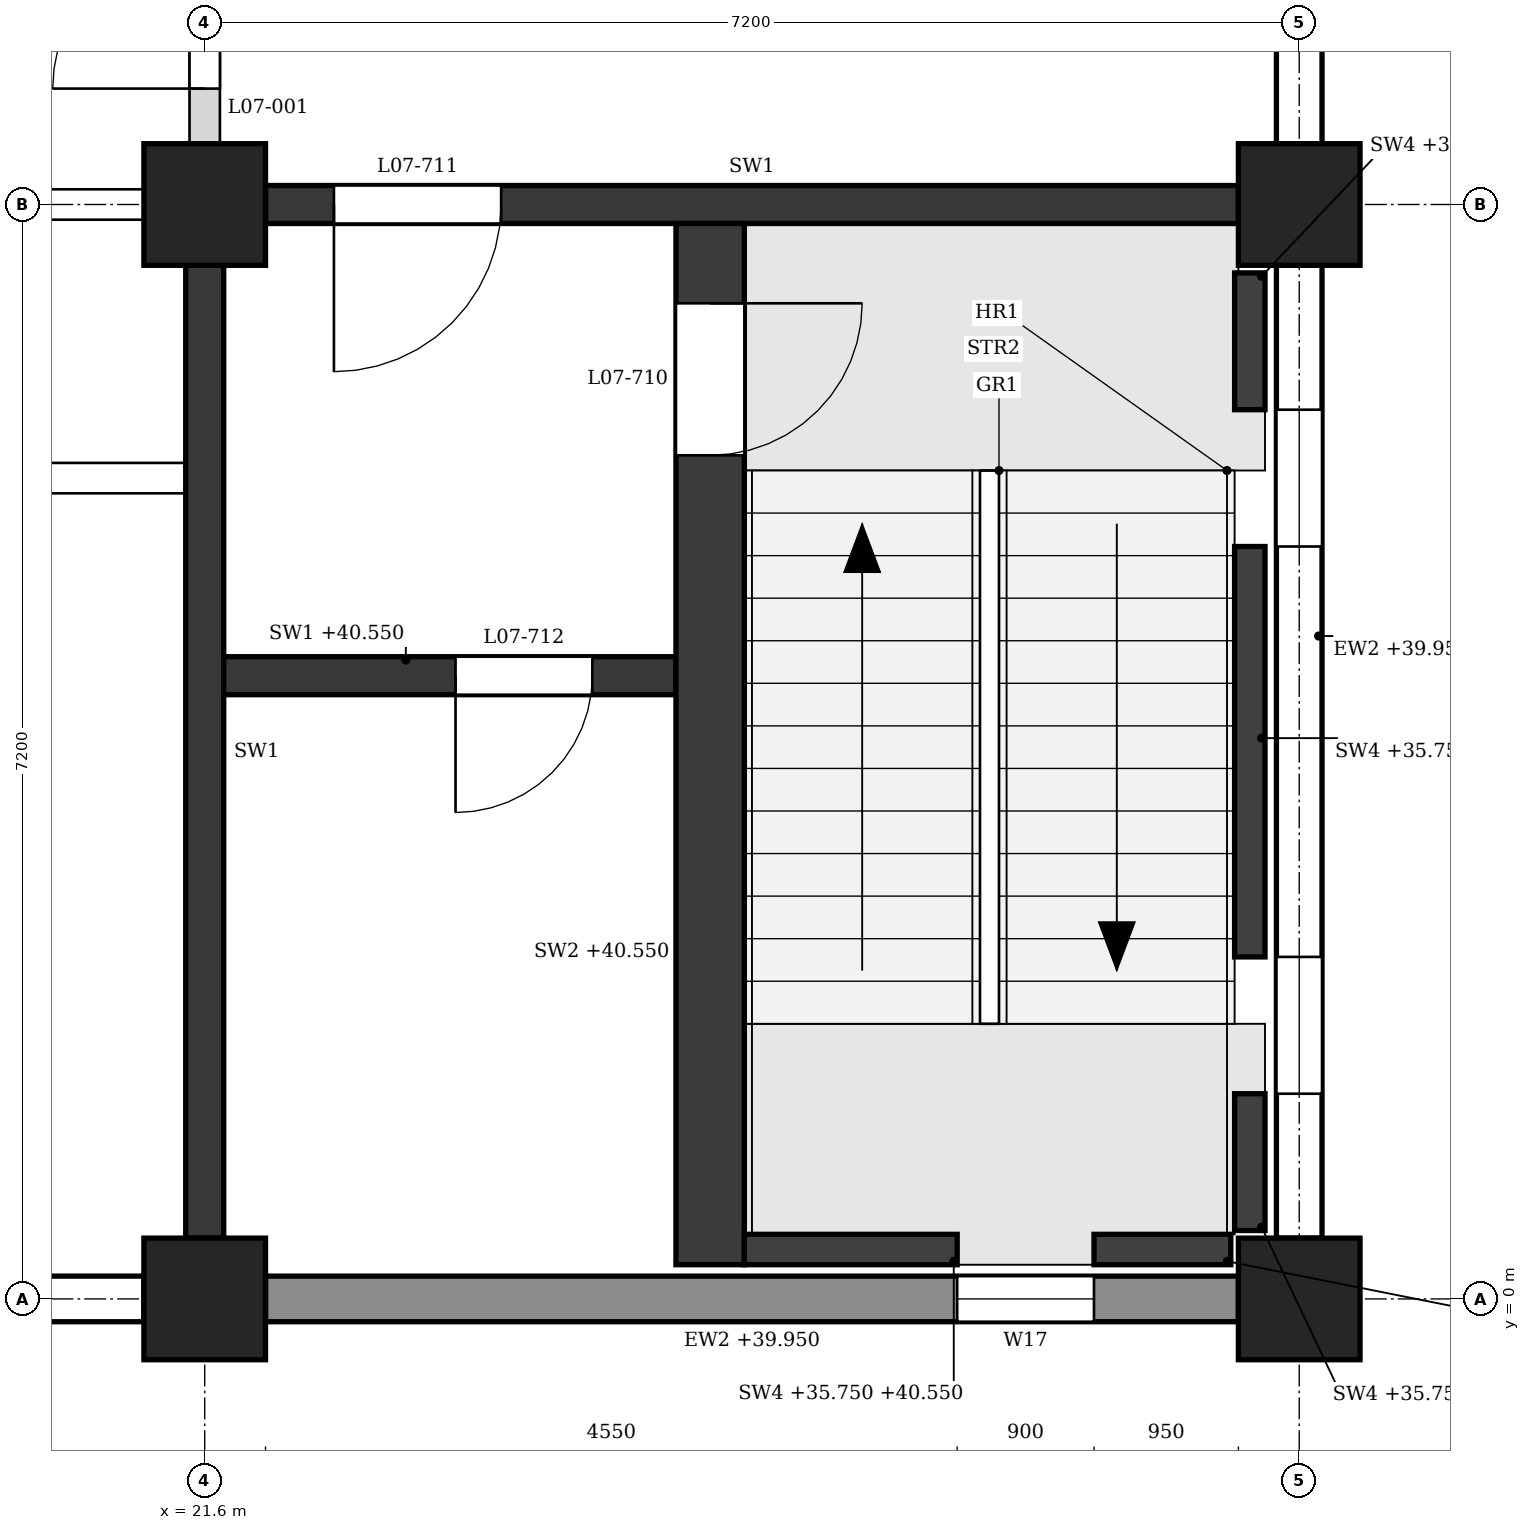
"""IFC4 building model, lengths in metres.
Left out: names, types, materials, properties, quantities, classifications, styles, units other than length and angle.
Written with IfcOpenShell. Run it as: python <this file> out.ifc"""

import sys

from ifc_helpers import new_model, si_unit, direction, frame, frame_2d, origin, origin_2d, place, context, subcontext, project, spatial, polyline, rectangle, outline, extrude, element, fill, save


model = new_model("IFC4")
c1 = context("Model", 3, precision=1e-05, world=origin(), true_north=direction((0.0, 1.0)))
c2 = subcontext(c1, "Body", "Model", "MODEL_VIEW")
j1 = project(units=[si_unit("LENGTHUNIT", "METRE"), si_unit("PLANEANGLEUNIT", "RADIAN")], contexts=[c1])
p1 = place(None, origin())
s1 = spatial("IfcSite", under=j1, at=p1, CompositionType="ELEMENT")
p2 = place(p1, origin())
s2 = spatial("IfcBuilding", under=s1, at=p2, CompositionType="ELEMENT")
p3 = place(p2, frame((0.0, 0.0, 36.0)))
s3 = spatial("IfcBuildingStorey", under=s2, at=p3, CompositionType="ELEMENT", Elevation=36.0)
for number, where, z_axis, x_axis in (
    (1, (21.6, 0.0, 0.0), (0.0, 0.0, 1.0), (1.0, 0.0, 0.0)),
    (2, (21.6, 7.2, 0.0), (0.0, 0.0, 1.0), (1.0, 0.0, 0.0)),
    (3, (28.8, 0.0, 0.0), (0.0, 0.0, 1.0), (1.0, 0.0, 0.0)),
    (4, (28.8, 7.2, 0.0), (0.0, 0.0, 1.0), (1.0, 0.0, 0.0)),
):
    element("IfcColumn", number, at=place(p3, frame(where, z_axis=z_axis, x_axis=x_axis)), inside=s3, PredefinedType="COLUMN", context=c2, shape_type="SweptSolid", body=[
        extrude(rectangle(XDim=0.8, YDim=0.8, at=origin_2d()), origin(), (0.0, 0.0, 1.0), 4.8),
    ])
p4 = place(p3, frame((14.8, 0.0, 0.0), z_axis=(0.0, 0.0, 1.0), x_axis=(1.0, 0.0, 0.0)))
e5 = element("IfcWall", 5, at=p4, inside=s3, PredefinedType="STANDARD", context=c2, shape_type="SweptSolid", body=[
    extrude(rectangle(XDim=6.4, YDim=0.3, at=frame_2d((3.2, 0.0))), origin(), (0.0, 0.0, 1.0), 3.95),
])
p5 = place(p4, frame((0.65, 0.0, 0.9)))
e6 = element("IfcOpeningElement", 6, at=p5, cuts=e5, PredefinedType="OPENING", context=c2, shape_type="SweptSolid", body=[
    extrude(outline(polyline([(0.0, 0.0), (1.5, 0.0), (1.5, 2.25), (0.75, 3.0), (0.0, 2.25), (0.0, 0.0)])), frame((0.0, 0.16, 0.0), z_axis=(0.0, -1.0, 0.0), x_axis=(1.0, 0.0, 0.0)), (0.0, 0.0, 1.0), 0.32),
])
p6 = place(p4, frame((4.25, 0.0, 0.9)))
e7 = element("IfcOpeningElement", 7, at=p6, cuts=e5, PredefinedType="OPENING", context=c2, shape_type="SweptSolid", body=[
    extrude(outline(polyline([(0.0, 0.0), (1.5, 0.0), (1.5, 2.25), (0.75, 3.0), (0.0, 2.25), (0.0, 0.0)])), frame((0.0, 0.16, 0.0), z_axis=(0.0, -1.0, 0.0), x_axis=(1.0, 0.0, 0.0)), (0.0, 0.0, 1.0), 0.32),
])
p7 = place(p3, frame((22.0, 0.0, 0.0), z_axis=(0.0, 0.0, 1.0), x_axis=(1.0, 0.0, 0.0)))
e8 = element("IfcWall", 8, at=p7, inside=s3, PredefinedType="STANDARD", context=c2, shape_type="SweptSolid", body=[
    extrude(rectangle(XDim=6.4, YDim=0.3, at=frame_2d((3.2, 0.0))), origin(), (0.0, 0.0, 1.0), 3.95),
])
p8 = place(p7, frame((4.55, 0.0, 0.9)))
e9 = element("IfcOpeningElement", 9, at=p8, cuts=e8, PredefinedType="OPENING", context=c2, shape_type="SweptSolid", body=[
    extrude(outline(polyline([(0.0, 0.0), (0.9, 0.0), (0.9, 2.55), (0.45, 3.0), (0.0, 2.55), (0.0, 0.0)])), frame((0.0, 0.16, 0.0), z_axis=(0.0, -1.0, 0.0), x_axis=(1.0, 0.0, 0.0)), (0.0, 0.0, 1.0), 0.32),
])
p9 = place(p3, frame((28.8, 0.4, 0.0), z_axis=(0.0, 0.0, 1.0), x_axis=(0.0, 1.0, 0.0)))
e10 = element("IfcWall", 10, at=p9, inside=s3, PredefinedType="STANDARD", context=c2, shape_type="SweptSolid", body=[
    extrude(rectangle(XDim=6.4, YDim=0.3, at=frame_2d((3.2, 0.0))), origin(), (0.0, 0.0, 1.0), 3.95),
])
p10 = place(p9, frame((0.95, 0.0, 0.9)))
e11 = element("IfcOpeningElement", 11, at=p10, cuts=e10, PredefinedType="OPENING", context=c2, shape_type="SweptSolid", body=[
    extrude(outline(polyline([(0.0, 0.0), (0.9, 0.0), (0.9, 2.55), (0.45, 3.0), (0.0, 2.55), (0.0, 0.0)])), frame((0.0, 0.16, 0.0), z_axis=(0.0, -1.0, 0.0), x_axis=(1.0, 0.0, 0.0)), (0.0, 0.0, 1.0), 0.32),
])
p11 = place(p9, frame((4.55, 0.0, 0.9)))
e12 = element("IfcOpeningElement", 12, at=p11, cuts=e10, PredefinedType="OPENING", context=c2, shape_type="SweptSolid", body=[
    extrude(outline(polyline([(0.0, 0.0), (0.9, 0.0), (0.9, 2.55), (0.45, 3.0), (0.0, 2.55), (0.0, 0.0)])), frame((0.0, 0.16, 0.0), z_axis=(0.0, -1.0, 0.0), x_axis=(1.0, 0.0, 0.0)), (0.0, 0.0, 1.0), 0.32),
])
p12 = place(p3, frame((28.8, 7.6, 0.0), z_axis=(0.0, 0.0, 1.0), x_axis=(0.0, 1.0, 0.0)))
e13 = element("IfcWall", 13, at=p12, inside=s3, PredefinedType="STANDARD", context=c2, shape_type="SweptSolid", body=[
    extrude(rectangle(XDim=6.4, YDim=0.3, at=frame_2d((3.2, 0.0))), origin(), (0.0, 0.0, 1.0), 3.95),
])
p13 = place(p12, frame((0.65, 0.0, 0.9)))
e14 = element("IfcOpeningElement", 14, at=p13, cuts=e13, PredefinedType="OPENING", context=c2, shape_type="SweptSolid", body=[
    extrude(outline(polyline([(0.0, 0.0), (1.5, 0.0), (1.5, 2.25), (0.75, 3.0), (0.0, 2.25), (0.0, 0.0)])), frame((0.0, 0.16, 0.0), z_axis=(0.0, -1.0, 0.0), x_axis=(1.0, 0.0, 0.0)), (0.0, 0.0, 1.0), 0.32),
])
p14 = place(p3, frame((22.0, 7.2, 0.0), z_axis=(0.0, 0.0, 1.0), x_axis=(1.0, 0.0, 0.0)))
e15 = element("IfcWall", 15, at=p14, inside=s3, PredefinedType="SHEAR", context=c2, shape_type="SweptSolid", body=[
    extrude(rectangle(XDim=6.4, YDim=0.25, at=frame_2d((3.2, 0.0))), origin(), (0.0, 0.0, 1.0), 3.85),
])
p15 = place(p14, frame((0.45, 0.0, 0.0)))
e16 = element("IfcOpeningElement", 16, at=p15, cuts=e15, PredefinedType="OPENING", context=c2, shape_type="SweptSolid", body=[
    extrude(rectangle(XDim=1.1, YDim=2.1, at=frame_2d((0.55, 1.05))), frame((0.0, 0.135, 0.0), z_axis=(0.0, -1.0, 0.0), x_axis=(1.0, 0.0, 0.0)), (0.0, 0.0, 1.0), 0.27),
])
p16 = place(p3, frame((21.6, 0.4, 0.0), z_axis=(0.0, 0.0, 1.0), x_axis=(0.0, 1.0, 0.0)))
e17 = element("IfcWall", 17, at=p16, inside=s3, PredefinedType="SHEAR", context=c2, shape_type="SweptSolid", body=[
    extrude(rectangle(XDim=6.4, YDim=0.25, at=frame_2d((3.2, 0.0))), origin(), (0.0, 0.0, 1.0), 3.85),
])
p17 = place(p3, frame((28.475, 0.45, -0.25), z_axis=(0.0, 0.0, 1.0), x_axis=(0.0, 1.0, 0.0)))
e18 = element("IfcWall", 18, at=p17, inside=s3, PredefinedType="SHEAR", context=c2, shape_type="SweptSolid", body=[
    extrude(rectangle(XDim=0.9, YDim=0.2, at=frame_2d((0.45, 0.0))), origin(), (0.0, 0.0, 1.0), 4.8),
])
p18 = place(p3, frame((28.475, 2.25, -0.25), z_axis=(0.0, 0.0, 1.0), x_axis=(0.0, 1.0, 0.0)))
e19 = element("IfcWall", 19, at=p18, inside=s3, PredefinedType="SHEAR", context=c2, shape_type="SweptSolid", body=[
    extrude(rectangle(XDim=2.7, YDim=0.2, at=frame_2d((1.35, 0.0))), origin(), (0.0, 0.0, 1.0), 4.8),
])
p19 = place(p3, frame((28.475, 5.85, -0.25), z_axis=(0.0, 0.0, 1.0), x_axis=(0.0, 1.0, 0.0)))
e20 = element("IfcWall", 20, at=p19, inside=s3, PredefinedType="SHEAR", context=c2, shape_type="SweptSolid", body=[
    extrude(rectangle(XDim=0.9, YDim=0.2, at=frame_2d((0.45, 0.0))), origin(), (0.0, 0.0, 1.0), 4.8),
])
p20 = place(p3, frame((25.15, 0.325, -0.25), z_axis=(0.0, 0.0, 1.0), x_axis=(1.0, 0.0, 0.0)))
e21 = element("IfcWall", 21, at=p20, inside=s3, PredefinedType="SHEAR", context=c2, shape_type="SweptSolid", body=[
    extrude(rectangle(XDim=1.4, YDim=0.2, at=frame_2d((0.7, 0.0))), origin(), (0.0, 0.0, 1.0), 4.8),
])
p21 = place(p3, frame((27.45, 0.325, -0.25), z_axis=(0.0, 0.0, 1.0), x_axis=(1.0, 0.0, 0.0)))
e22 = element("IfcWall", 22, at=p21, inside=s3, PredefinedType="SHEAR", context=c2, shape_type="SweptSolid", body=[
    extrude(rectangle(XDim=0.9, YDim=0.2, at=frame_2d((0.45, 0.0))), origin(), (0.0, 0.0, 1.0), 4.8),
])
p22 = place(p3, frame((24.925, 0.225, 0.0), z_axis=(0.0, 0.0, 1.0), x_axis=(0.0, 1.0, 0.0)))
e23 = element("IfcWall", 23, at=p22, inside=s3, PredefinedType="SHEAR", context=c2, shape_type="SweptSolid", body=[
    extrude(rectangle(XDim=6.85, YDim=0.45, at=frame_2d((3.425, 0.0))), origin(), (0.0, 0.0, 1.0), 4.55),
])
p23 = place(p22, frame((5.325, 0.0, 0.0)))
e24 = element("IfcOpeningElement", 24, at=p23, cuts=e23, PredefinedType="OPENING", context=c2, shape_type="SweptSolid", body=[
    extrude(rectangle(XDim=1.0, YDim=2.1, at=frame_2d((0.5, 1.05))), frame((0.0, 0.235, 0.0), z_axis=(0.0, -1.0, 0.0), x_axis=(1.0, 0.0, 0.0)), (0.0, 0.0, 1.0), 0.47),
])
p24 = place(p3, frame((21.725, 4.1, 0.0), z_axis=(0.0, 0.0, 1.0), x_axis=(1.0, 0.0, 0.0)))
e25 = element("IfcWall", 25, at=p24, inside=s3, PredefinedType="SHEAR", context=c2, shape_type="SweptSolid", body=[
    extrude(rectangle(XDim=2.975, YDim=0.25, at=frame_2d((1.487, 0.0))), origin(), (0.0, 0.0, 1.0), 4.55),
])
p25 = place(p24, frame((1.525, 0.0, 0.0)))
e26 = element("IfcOpeningElement", 26, at=p25, cuts=e25, PredefinedType="OPENING", context=c2, shape_type="SweptSolid", body=[
    extrude(rectangle(XDim=0.9, YDim=2.1, at=frame_2d((0.45, 1.05))), frame((0.0, 0.135, 0.0), z_axis=(0.0, -1.0, 0.0), x_axis=(1.0, 0.0, 0.0)), (0.0, 0.0, 1.0), 0.27),
])
p26 = place(p3, frame((7.325, 5.4, 0.0), z_axis=(0.0, 0.0, 1.0), x_axis=(1.0, 0.0, 0.0)))
e27 = element("IfcWall", 27, at=p26, inside=s3, PredefinedType="PARTITIONING", context=c2, shape_type="SweptSolid", body=[
    extrude(outline(polyline([(0.0, 0.0), (14.15, 0.0), (14.15, 3.85), (14.05, 3.85), (14.05, 4.55), (7.3, 4.55), (7.3, 3.85), (6.85, 3.85), (6.85, 4.55), (0.1, 4.55), (0.1, 3.85), (0.0, 3.85), (0.0, 0.0)])), frame((0.0, 0.1, 0.0), z_axis=(0.0, -1.0, 0.0), x_axis=(1.0, 0.0, 0.0)), (0.0, 0.0, 1.0), 0.2),
])
p27 = place(p26, frame((1.238, 0.0, 0.0)))
e28 = element("IfcOpeningElement", 28, at=p27, cuts=e27, PredefinedType="OPENING", context=c2, shape_type="SweptSolid", body=[
    extrude(rectangle(XDim=1.0, YDim=2.1, at=frame_2d((0.5, 1.05))), frame((0.0, 0.11, 0.0), z_axis=(0.0, -1.0, 0.0), x_axis=(1.0, 0.0, 0.0)), (0.0, 0.0, 1.0), 0.22),
])
p28 = place(p26, frame((4.775, 0.0, 0.0)))
e29 = element("IfcOpeningElement", 29, at=p28, cuts=e27, PredefinedType="OPENING", context=c2, shape_type="SweptSolid", body=[
    extrude(rectangle(XDim=1.0, YDim=2.1, at=frame_2d((0.5, 1.05))), frame((0.0, 0.11, 0.0), z_axis=(0.0, -1.0, 0.0), x_axis=(1.0, 0.0, 0.0)), (0.0, 0.0, 1.0), 0.22),
])
p29 = place(p26, frame((8.375, 0.0, 0.0)))
e30 = element("IfcOpeningElement", 30, at=p29, cuts=e27, PredefinedType="OPENING", context=c2, shape_type="SweptSolid", body=[
    extrude(rectangle(XDim=1.0, YDim=2.1, at=frame_2d((0.5, 1.05))), frame((0.0, 0.11, 0.0), z_axis=(0.0, -1.0, 0.0), x_axis=(1.0, 0.0, 0.0)), (0.0, 0.0, 1.0), 0.22),
])
p30 = place(p26, frame((11.913, 0.0, 0.0)))
e31 = element("IfcOpeningElement", 31, at=p30, cuts=e27, PredefinedType="OPENING", context=c2, shape_type="SweptSolid", body=[
    extrude(rectangle(XDim=1.0, YDim=2.1, at=frame_2d((0.5, 1.05))), frame((0.0, 0.11, 0.0), z_axis=(0.0, -1.0, 0.0), x_axis=(1.0, 0.0, 0.0)), (0.0, 0.0, 1.0), 0.22),
])
p31 = place(p3, frame((14.8, 7.2, 0.0), z_axis=(0.0, 0.0, 1.0), x_axis=(1.0, 0.0, 0.0)))
e32 = element("IfcWall", 32, at=p31, inside=s3, PredefinedType="PARTITIONING", context=c2, shape_type="SweptSolid", body=[
    extrude(rectangle(XDim=6.4, YDim=0.2, at=frame_2d((3.2, 0.0))), origin(), (0.0, 0.0, 1.0), 3.85),
])
p32 = place(p31, frame((4.3, 0.0, 0.0)))
e33 = element("IfcOpeningElement", 33, at=p32, cuts=e32, PredefinedType="OPENING", context=c2, shape_type="SweptSolid", body=[
    extrude(rectangle(XDim=1.0, YDim=2.1, at=frame_2d((0.5, 1.05))), frame((0.0, 0.11, 0.0), z_axis=(0.0, -1.0, 0.0), x_axis=(1.0, 0.0, 0.0)), (0.0, 0.0, 1.0), 0.22),
])
p33 = place(p3, frame((21.6, 7.6, 0.0), z_axis=(0.0, 0.0, 1.0), x_axis=(0.0, 1.0, 0.0)))
e34 = element("IfcWall", 34, at=p33, inside=s3, PredefinedType="PARTITIONING", context=c2, shape_type="SweptSolid", body=[
    extrude(rectangle(XDim=2.725, YDim=0.2, at=frame_2d((1.362, 0.0))), origin(), (0.0, 0.0, 1.0), 3.85),
])
p34 = place(p33, frame((0.362, 0.0, 0.0)))
e35 = element("IfcOpeningElement", 35, at=p34, cuts=e34, PredefinedType="OPENING", context=c2, shape_type="SweptSolid", body=[
    extrude(rectangle(XDim=2.0, YDim=2.4, at=frame_2d((1.0, 1.2))), frame((0.0, 0.11, 0.0), z_axis=(0.0, -1.0, 0.0), x_axis=(1.0, 0.0, 0.0)), (0.0, 0.0, 1.0), 0.22),
])
p35 = place(p10, origin())
e36 = element("IfcWindow", 36, at=p35, inside=s3, PartitioningType="SINGLE_PANEL", PredefinedType="WINDOW", context=c2, shape_type="SweptSolid", body=[
    extrude(outline(polyline([(0.0, 0.0), (0.9, 0.0), (0.9, 2.55), (0.45, 3.0), (0.0, 2.55), (0.0, 0.0)])), frame((0.0, 0.03, 0.0), z_axis=(0.0, -1.0, 0.0), x_axis=(1.0, 0.0, 0.0)), (0.0, 0.0, 1.0), 0.06),
])
fill(e11, e36)
p36 = place(p11, origin())
e37 = element("IfcWindow", 37, at=p36, inside=s3, PartitioningType="SINGLE_PANEL", PredefinedType="WINDOW", context=c2, shape_type="SweptSolid", body=[
    extrude(outline(polyline([(0.0, 0.0), (0.9, 0.0), (0.9, 2.55), (0.45, 3.0), (0.0, 2.55), (0.0, 0.0)])), frame((0.0, 0.03, 0.0), z_axis=(0.0, -1.0, 0.0), x_axis=(1.0, 0.0, 0.0)), (0.0, 0.0, 1.0), 0.06),
])
fill(e12, e37)
p37 = place(p8, origin())
e38 = element("IfcWindow", 38, at=p37, inside=s3, PartitioningType="SINGLE_PANEL", PredefinedType="WINDOW", context=c2, shape_type="SweptSolid", body=[
    extrude(outline(polyline([(0.0, 0.0), (0.9, 0.0), (0.9, 2.55), (0.45, 3.0), (0.0, 2.55), (0.0, 0.0)])), frame((0.0, 0.03, 0.0), z_axis=(0.0, -1.0, 0.0), x_axis=(1.0, 0.0, 0.0)), (0.0, 0.0, 1.0), 0.06),
])
fill(e9, e38)
p38 = place(p23, frame((1.0, 0.0, 0.0), z_axis=(0.0, 0.0, 1.0), x_axis=(-1.0, 0.0, 0.0)))
e39 = element("IfcDoor", 39, at=p38, inside=s3, OperationType="SINGLE_SWING_LEFT", PredefinedType="DOOR", context=c2, shape_type="SweptSolid", body=[
    extrude(rectangle(XDim=1.0, YDim=2.1, at=frame_2d((0.5, 1.05))), frame((0.0, 0.025, 0.0), z_axis=(0.0, -1.0, 0.0), x_axis=(1.0, 0.0, 0.0)), (0.0, 0.0, 1.0), 0.05),
])
fill(e24, e39)
p39 = place(p15, frame((1.1, 0.0, 0.0), z_axis=(0.0, 0.0, 1.0), x_axis=(-1.0, 0.0, 0.0)))
e40 = element("IfcDoor", 40, at=p39, inside=s3, OperationType="SINGLE_SWING_RIGHT", PredefinedType="DOOR", context=c2, shape_type="SweptSolid", body=[
    extrude(rectangle(XDim=1.1, YDim=2.1, at=frame_2d((0.55, 1.05))), frame((0.0, 0.025, 0.0), z_axis=(0.0, -1.0, 0.0), x_axis=(1.0, 0.0, 0.0)), (0.0, 0.0, 1.0), 0.05),
])
fill(e16, e40)
p40 = place(p25, frame((0.9, 0.0, 0.0), z_axis=(0.0, 0.0, 1.0), x_axis=(-1.0, 0.0, 0.0)))
e41 = element("IfcDoor", 41, at=p40, inside=s3, OperationType="SINGLE_SWING_RIGHT", PredefinedType="DOOR", context=c2, shape_type="SweptSolid", body=[
    extrude(rectangle(XDim=0.9, YDim=2.1, at=frame_2d((0.45, 1.05))), frame((0.0, 0.025, 0.0), z_axis=(0.0, -1.0, 0.0), x_axis=(1.0, 0.0, 0.0)), (0.0, 0.0, 1.0), 0.05),
])
fill(e26, e41)
p41 = place(p34, origin())
e42 = element("IfcDoor", 42, at=p41, inside=s3, OperationType="DOUBLE_DOOR_SINGLE_SWING", PredefinedType="DOOR", context=c2, shape_type="SweptSolid", body=[
    extrude(rectangle(XDim=2.0, YDim=2.4, at=frame_2d((1.0, 1.2))), frame((0.0, 0.025, 0.0), z_axis=(0.0, -1.0, 0.0), x_axis=(1.0, 0.0, 0.0)), (0.0, 0.0, 1.0), 0.05),
])
fill(e35, e42)
save(model, sys.argv[1])
